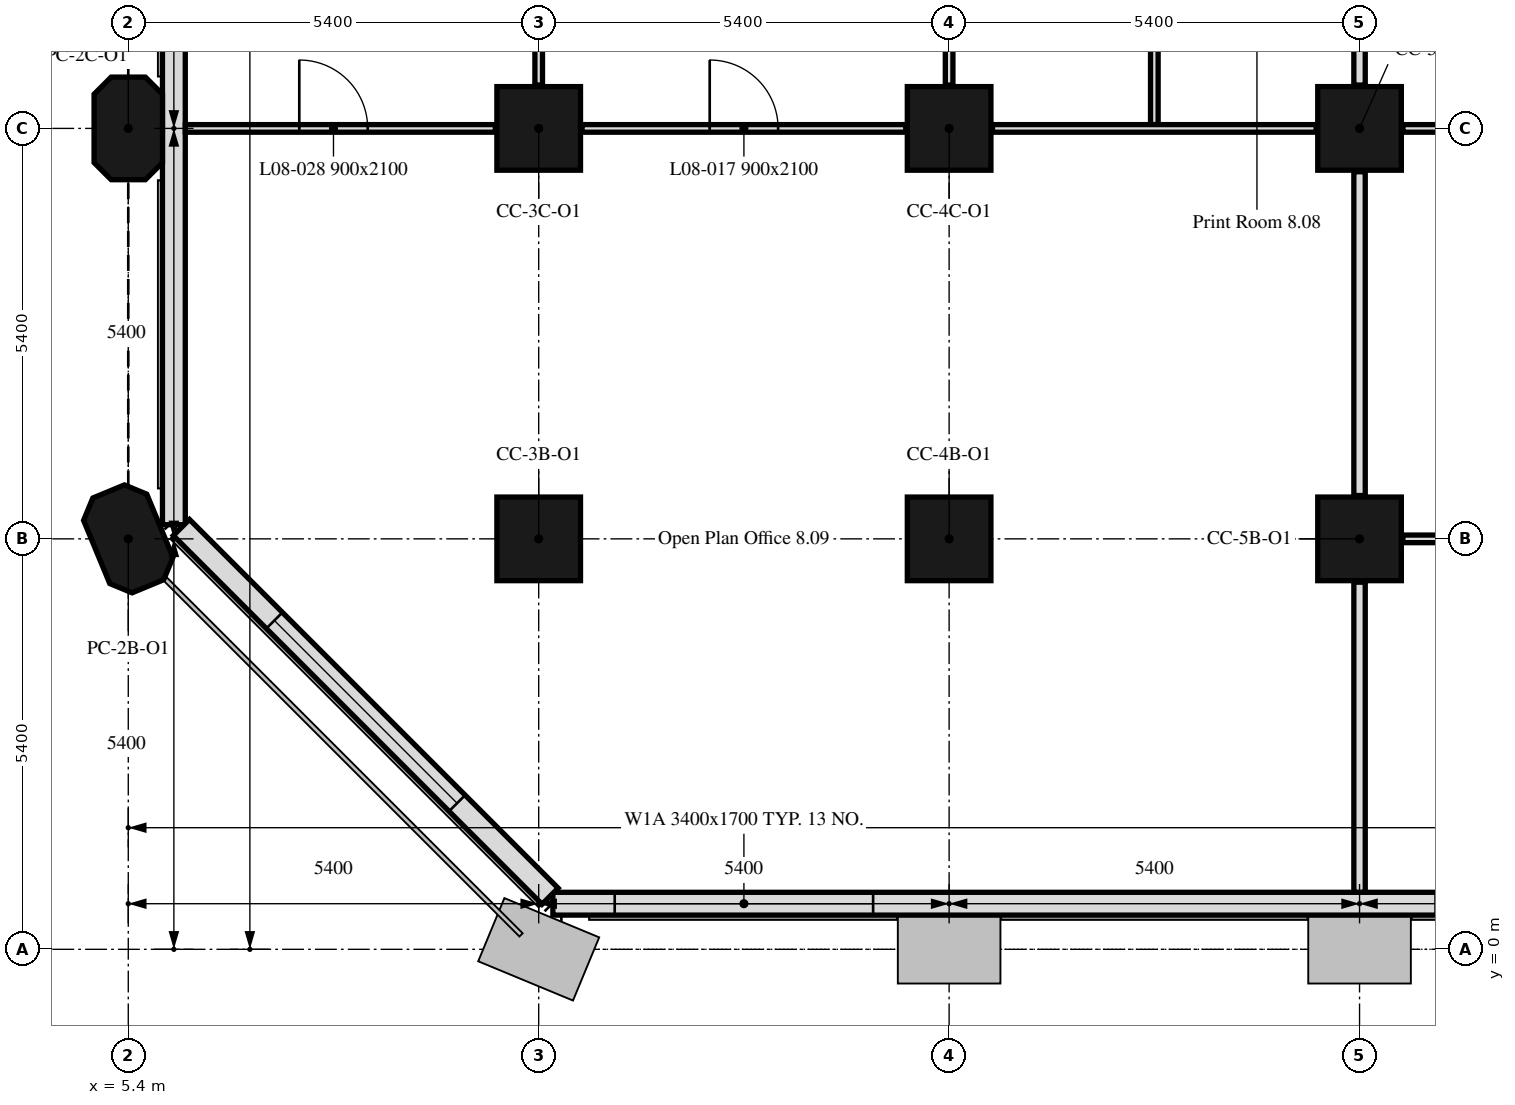
"""IFC4 building model, lengths in metres.
Left out: names, types, materials, properties, quantities, classifications, styles, units other than length and angle.
Written with IfcOpenShell. Run it as: python <this file> out.ifc"""

import sys

from ifc_helpers import new_model, si_unit, direction, frame, frame_2d, origin, origin_2d, place, context, subcontext, project, spatial, polyline, rectangle, outline, extrude, element, fill, save


model = new_model("IFC4")
c1 = context("Model", 3, precision=1e-05, world=origin(), true_north=direction((0.0, 1.0)))
c2 = subcontext(c1, "Body", "Model", "MODEL_VIEW")
j1 = project(units=[si_unit("LENGTHUNIT", "METRE"), si_unit("PLANEANGLEUNIT", "RADIAN")], contexts=[c1])
p1 = place(None, origin())
s1 = spatial("IfcSite", under=j1, at=p1, CompositionType="ELEMENT")
p2 = place(p1, origin())
s2 = spatial("IfcBuilding", under=s1, at=p2, CompositionType="ELEMENT")
p3 = place(p2, frame((0.0, 0.0, 41.2)))
s3 = spatial("IfcBuildingStorey", under=s2, at=p3, CompositionType="ELEMENT", Elevation=41.2)
p4 = place(p3, frame((5.4, 5.4, 0.0), z_axis=(0.0, 0.0, 1.0), x_axis=(-0.382683432365, 0.923879532511, 0.0)))
e1 = element("IfcColumn", 1, at=p4, inside=s3, PredefinedType="COLUMN", context=c2, shape_type="SweptSolid", body=[
    extrude(outline(polyline([(-0.45, -0.45), (0.45, -0.45), (0.675, -0.225), (0.675, 0.225), (0.45, 0.45), (-0.45, 0.45), (-0.675, 0.225), (-0.675, -0.225), (-0.45, -0.45)])), origin(), (0.0, 0.0, 1.0), 3.5),
])
for number, where, z_axis, x_axis in (
    (2, (10.8, 5.4, 0.0), (0.0, 0.0, 1.0), (1.0, 0.0, 0.0)),
    (3, (16.2, 5.4, 0.0), (0.0, 0.0, 1.0), (1.0, 0.0, 0.0)),
    (4, (21.6, 5.4, 0.0), (0.0, 0.0, 1.0), (1.0, 0.0, 0.0)),
):
    element("IfcColumn", number, at=place(p3, frame(where, z_axis=z_axis, x_axis=x_axis)), inside=s3, PredefinedType="COLUMN", context=c2, shape_type="SweptSolid", body=[
        extrude(rectangle(XDim=1.1, YDim=1.1, at=origin_2d()), origin(), (0.0, 0.0, 1.0), 3.5),
    ])
p5 = place(p3, frame((5.4, 10.8, 0.0), z_axis=(0.0, 0.0, 1.0), x_axis=(0.0, 1.0, 0.0)))
e5 = element("IfcColumn", 5, at=p5, inside=s3, PredefinedType="COLUMN", context=c2, shape_type="SweptSolid", body=[
    extrude(outline(polyline([(-0.45, -0.45), (0.45, -0.45), (0.675, -0.225), (0.675, 0.225), (0.45, 0.45), (-0.45, 0.45), (-0.675, 0.225), (-0.675, -0.225), (-0.45, -0.45)])), origin(), (0.0, 0.0, 1.0), 3.5),
])
for number, where, z_axis, x_axis in (
    (6, (10.8, 10.8, 0.0), (0.0, 0.0, 1.0), (1.0, 0.0, 0.0)),
    (7, (16.2, 10.8, 0.0), (0.0, 0.0, 1.0), (1.0, 0.0, 0.0)),
    (8, (21.6, 10.8, 0.0), (0.0, 0.0, 1.0), (1.0, 0.0, 0.0)),
):
    element("IfcColumn", number, at=place(p3, frame(where, z_axis=z_axis, x_axis=x_axis)), inside=s3, PredefinedType="COLUMN", context=c2, shape_type="SweptSolid", body=[
        extrude(rectangle(XDim=1.1, YDim=1.1, at=origin_2d()), origin(), (0.0, 0.0, 1.0), 3.5),
    ])
p6 = place(p3, frame((10.986, 0.6, 0.0), z_axis=(0.0, 0.0, 1.0), x_axis=(1.0, 0.0, 0.0)))
e9 = element("IfcWall", 9, at=p6, inside=s3, PredefinedType="SOLIDWALL", context=c2, shape_type="SweptSolid", body=[
    extrude(rectangle(XDim=32.027, YDim=0.3, at=frame_2d((16.014, 0.0))), origin(), (0.0, 0.0, 1.0), 3.5),
])
p7 = place(p6, frame((0.814, 0.0, 0.9)))
e10 = element("IfcOpeningElement", 10, at=p7, cuts=e9, PredefinedType="OPENING", context=c2, shape_type="SweptSolid", body=[
    extrude(rectangle(XDim=3.4, YDim=1.7, at=frame_2d((1.7, 0.85))), frame((0.0, 0.16, 0.0), z_axis=(0.0, -1.0, 0.0), x_axis=(1.0, 0.0, 0.0)), (0.0, 0.0, 1.0), 0.32),
])
p8 = place(p6, frame((11.614, 0.0, 0.9)))
e11 = element("IfcOpeningElement", 11, at=p8, cuts=e9, PredefinedType="OPENING", context=c2, shape_type="SweptSolid", body=[
    extrude(rectangle(XDim=3.4, YDim=1.7, at=frame_2d((1.7, 0.85))), frame((0.0, 0.16, 0.0), z_axis=(0.0, -1.0, 0.0), x_axis=(1.0, 0.0, 0.0)), (0.0, 0.0, 1.0), 0.32),
])
p9 = place(p6, frame((22.414, 0.0, 0.9)))
e12 = element("IfcOpeningElement", 12, at=p9, cuts=e9, PredefinedType="OPENING", context=c2, shape_type="SweptSolid", body=[
    extrude(rectangle(XDim=3.4, YDim=1.7, at=frame_2d((1.7, 0.85))), frame((0.0, 0.16, 0.0), z_axis=(0.0, -1.0, 0.0), x_axis=(1.0, 0.0, 0.0)), (0.0, 0.0, 1.0), 0.32),
])
p10 = place(p3, frame((6.0, 16.2, 0.0), z_axis=(0.0, 0.0, 1.0), x_axis=(0.0, -1.0, 0.0)))
e13 = element("IfcWall", 13, at=p10, inside=s3, PredefinedType="SOLIDWALL", context=c2, shape_type="SweptSolid", body=[
    extrude(rectangle(XDim=10.614, YDim=0.3, at=frame_2d((5.307, 0.0))), origin(), (0.0, 0.0, 1.0), 3.5),
])
p11 = place(p10, frame((1.35, 0.0, 0.9)))
e14 = element("IfcOpeningElement", 14, at=p11, cuts=e13, PredefinedType="OPENING", context=c2, shape_type="SweptSolid", body=[
    extrude(rectangle(XDim=1.1, YDim=1.7, at=frame_2d((0.55, 0.85))), frame((0.0, 0.16, 0.0), z_axis=(0.0, -1.0, 0.0), x_axis=(1.0, 0.0, 0.0)), (0.0, 0.0, 1.0), 0.32),
])
p12 = place(p10, frame((2.95, 0.0, 0.9)))
e15 = element("IfcOpeningElement", 15, at=p12, cuts=e13, PredefinedType="OPENING", context=c2, shape_type="SweptSolid", body=[
    extrude(rectangle(XDim=1.1, YDim=1.7, at=frame_2d((0.55, 0.85))), frame((0.0, 0.16, 0.0), z_axis=(0.0, -1.0, 0.0), x_axis=(1.0, 0.0, 0.0)), (0.0, 0.0, 1.0), 0.32),
])
p13 = place(p3, frame((6.099, 5.55, 0.0), z_axis=(0.0, 0.0, 1.0), x_axis=(0.707106781187, -0.707106781187, 0.0)))
e16 = element("IfcWall", 16, at=p13, inside=s3, PredefinedType="SOLIDWALL", context=c2, shape_type="SweptSolid", body=[
    extrude(rectangle(XDim=6.86, YDim=0.3, at=frame_2d((3.43, 0.0))), origin(), (0.0, 0.0, 1.0), 3.5),
])
p14 = place(p13, frame((1.73, 0.0, 0.9)))
e17 = element("IfcOpeningElement", 17, at=p14, cuts=e16, PredefinedType="OPENING", context=c2, shape_type="SweptSolid", body=[
    extrude(rectangle(XDim=3.4, YDim=1.7, at=frame_2d((1.7, 0.85))), frame((0.0, 0.16, 0.0), z_axis=(0.0, -1.0, 0.0), x_axis=(1.0, 0.0, 0.0)), (0.0, 0.0, 1.0), 0.32),
])
p15 = place(p3, frame((6.151, 10.8, 0.0), z_axis=(0.0, 0.0, 1.0), x_axis=(1.0, 0.0, 0.0)))
e18 = element("IfcWall", 18, at=p15, inside=s3, PredefinedType="PARTITIONING", context=c2, shape_type="SweptSolid", body=[
    extrude(rectangle(XDim=4.079, YDim=0.1, at=frame_2d((2.04, 0.0))), origin(), (0.0, 0.0, 1.0), 3.5),
])
p16 = place(p15, frame((1.499, 0.0, 0.0)))
e19 = element("IfcOpeningElement", 19, at=p16, cuts=e18, PredefinedType="OPENING", context=c2, shape_type="SweptSolid", body=[
    extrude(rectangle(XDim=0.9, YDim=2.1, at=frame_2d((0.45, 1.05))), frame((0.0, 0.05, 0.0), z_axis=(0.0, -1.0, 0.0), x_axis=(1.0, 0.0, 0.0)), (0.0, 0.0, 1.0), 0.1),
])
p17 = place(p3, frame((10.8, 11.37, 0.0), z_axis=(0.0, 0.0, 1.0), x_axis=(0.0, 1.0, 0.0)))
e20 = element("IfcWall", 20, at=p17, inside=s3, PredefinedType="PARTITIONING", context=c2, shape_type="SweptSolid", body=[
    extrude(rectangle(XDim=2.055, YDim=0.1, at=frame_2d((1.027, 0.0))), origin(), (0.0, 0.0, 1.0), 3.5),
])
p18 = place(p3, frame((11.37, 10.8, 0.0), z_axis=(0.0, 0.0, 1.0), x_axis=(1.0, 0.0, 0.0)))
e21 = element("IfcWall", 21, at=p18, inside=s3, PredefinedType="PARTITIONING", context=c2, shape_type="SweptSolid", body=[
    extrude(rectangle(XDim=4.26, YDim=0.1, at=frame_2d((2.13, 0.0))), origin(), (0.0, 0.0, 1.0), 3.5),
])
p19 = place(p18, frame((1.68, 0.0, 0.0)))
e22 = element("IfcOpeningElement", 22, at=p19, cuts=e21, PredefinedType="OPENING", context=c2, shape_type="SweptSolid", body=[
    extrude(rectangle(XDim=0.9, YDim=2.1, at=frame_2d((0.45, 1.05))), frame((0.0, 0.05, 0.0), z_axis=(0.0, -1.0, 0.0), x_axis=(1.0, 0.0, 0.0)), (0.0, 0.0, 1.0), 0.1),
])
p20 = place(p3, frame((16.2, 11.37, 0.0), z_axis=(0.0, 0.0, 1.0), x_axis=(0.0, 1.0, 0.0)))
e23 = element("IfcWall", 23, at=p20, inside=s3, PredefinedType="PARTITIONING", context=c2, shape_type="SweptSolid", body=[
    extrude(rectangle(XDim=2.055, YDim=0.1, at=frame_2d((1.027, 0.0))), origin(), (0.0, 0.0, 1.0), 2.75),
])
p21 = place(p3, frame((18.9, 10.85, 0.0), z_axis=(0.0, 0.0, 1.0), x_axis=(0.0, 1.0, 0.0)))
e24 = element("IfcWall", 24, at=p21, inside=s3, PredefinedType="PARTITIONING", context=c2, shape_type="SweptSolid", body=[
    extrude(rectangle(XDim=2.575, YDim=0.1, at=frame_2d((1.288, 0.0))), origin(), (0.0, 0.0, 1.0), 3.5),
])
p22 = place(p3, frame((16.77, 10.8, 0.0), z_axis=(0.0, 0.0, 1.0), x_axis=(1.0, 0.0, 0.0)))
e25 = element("IfcWall", 25, at=p22, inside=s3, PredefinedType="PARTITIONING", context=c2, shape_type="SweptSolid", body=[
    extrude(rectangle(XDim=4.26, YDim=0.1, at=frame_2d((2.13, 0.0))), origin(), (0.0, 0.0, 1.0), 3.5),
])
p23 = place(p3, frame((21.6, 11.37, 0.0), z_axis=(0.0, 0.0, 1.0), x_axis=(0.0, 1.0, 0.0)))
e26 = element("IfcWall", 26, at=p23, inside=s3, PredefinedType="PARTITIONING", context=c2, shape_type="SweptSolid", body=[
    extrude(rectangle(XDim=2.055, YDim=0.15, at=frame_2d((1.027, 0.0))), origin(), (0.0, 0.0, 1.0), 2.75),
])
p24 = place(p3, frame((21.6, 0.751, 0.0), z_axis=(0.0, 0.0, 1.0), x_axis=(0.0, 1.0, 0.0)))
e27 = element("IfcWall", 27, at=p24, inside=s3, PredefinedType="PARTITIONING", context=c2, shape_type="SweptSolid", body=[
    extrude(rectangle(XDim=4.079, YDim=0.15, at=frame_2d((2.04, 0.0))), origin(), (0.0, 0.0, 1.0), 2.75),
])
p25 = place(p3, frame((21.6, 5.97, 0.0), z_axis=(0.0, 0.0, 1.0), x_axis=(0.0, 1.0, 0.0)))
e28 = element("IfcWall", 28, at=p25, inside=s3, PredefinedType="PARTITIONING", context=c2, shape_type="SweptSolid", body=[
    extrude(rectangle(XDim=4.26, YDim=0.15, at=frame_2d((2.13, 0.0))), origin(), (0.0, 0.0, 1.0), 2.75),
])
p26 = place(p3, frame((22.17, 10.8, 0.0), z_axis=(0.0, 0.0, 1.0), x_axis=(1.0, 0.0, 0.0)))
e29 = element("IfcWall", 29, at=p26, inside=s3, PredefinedType="PARTITIONING", context=c2, shape_type="SweptSolid", body=[
    extrude(rectangle(XDim=4.26, YDim=0.1, at=frame_2d((2.13, 0.0))), origin(), (0.0, 0.0, 1.0), 3.5),
])
p27 = place(p26, frame((1.68, 0.0, 0.0)))
e30 = element("IfcOpeningElement", 30, at=p27, cuts=e29, PredefinedType="OPENING", context=c2, shape_type="SweptSolid", body=[
    extrude(rectangle(XDim=0.9, YDim=2.1, at=frame_2d((0.45, 1.05))), frame((0.0, 0.05, 0.0), z_axis=(0.0, -1.0, 0.0), x_axis=(1.0, 0.0, 0.0)), (0.0, 0.0, 1.0), 0.1),
])
p28 = place(p3, frame((22.17, 5.4, 0.0), z_axis=(0.0, 0.0, 1.0), x_axis=(1.0, 0.0, 0.0)))
e31 = element("IfcWall", 31, at=p28, inside=s3, PredefinedType="PARTITIONING", context=c2, shape_type="SweptSolid", body=[
    extrude(rectangle(XDim=4.26, YDim=0.1, at=frame_2d((2.13, 0.0))), origin(), (0.0, 0.0, 1.0), 3.5),
])
p29 = place(p28, frame((1.68, 0.0, 0.0)))
e32 = element("IfcOpeningElement", 32, at=p29, cuts=e31, PredefinedType="OPENING", context=c2, shape_type="SweptSolid", body=[
    extrude(rectangle(XDim=0.9, YDim=2.1, at=frame_2d((0.45, 1.05))), frame((0.0, 0.05, 0.0), z_axis=(0.0, -1.0, 0.0), x_axis=(1.0, 0.0, 0.0)), (0.0, 0.0, 1.0), 0.1),
])
p30 = place(p7, origin())
e33 = element("IfcWindow", 33, at=p30, inside=s3, PartitioningType="SINGLE_PANEL", PredefinedType="WINDOW", context=c2, shape_type="SweptSolid", body=[
    extrude(rectangle(XDim=3.4, YDim=1.7, at=frame_2d((1.7, 0.85))), frame((0.0, 0.03, 0.0), z_axis=(0.0, -1.0, 0.0), x_axis=(1.0, 0.0, 0.0)), (0.0, 0.0, 1.0), 0.06),
])
fill(e10, e33)
p31 = place(p8, origin())
e34 = element("IfcWindow", 34, at=p31, inside=s3, PartitioningType="SINGLE_PANEL", PredefinedType="WINDOW", context=c2, shape_type="SweptSolid", body=[
    extrude(rectangle(XDim=3.4, YDim=1.7, at=frame_2d((1.7, 0.85))), frame((0.0, 0.03, 0.0), z_axis=(0.0, -1.0, 0.0), x_axis=(1.0, 0.0, 0.0)), (0.0, 0.0, 1.0), 0.06),
])
fill(e11, e34)
p32 = place(p14, origin())
e35 = element("IfcWindow", 35, at=p32, inside=s3, PartitioningType="SINGLE_PANEL", PredefinedType="WINDOW", context=c2, shape_type="SweptSolid", body=[
    extrude(rectangle(XDim=3.4, YDim=1.7, at=frame_2d((1.7, 0.85))), frame((0.0, 0.03, 0.0), z_axis=(0.0, -1.0, 0.0), x_axis=(1.0, 0.0, 0.0)), (0.0, 0.0, 1.0), 0.06),
])
fill(e17, e35)
p33 = place(p19, origin())
e36 = element("IfcDoor", 36, at=p33, inside=s3, OperationType="SINGLE_SWING_LEFT", PredefinedType="DOOR", context=c2, shape_type="SweptSolid", body=[
    extrude(rectangle(XDim=0.9, YDim=2.1, at=frame_2d((0.45, 1.05))), frame((0.0, 0.025, 0.0), z_axis=(0.0, -1.0, 0.0), x_axis=(1.0, 0.0, 0.0)), (0.0, 0.0, 1.0), 0.05),
])
fill(e22, e36)
p34 = place(p16, origin())
e37 = element("IfcDoor", 37, at=p34, inside=s3, OperationType="SINGLE_SWING_RIGHT", PredefinedType="DOOR", context=c2, shape_type="SweptSolid", body=[
    extrude(rectangle(XDim=0.9, YDim=2.1, at=frame_2d((0.45, 1.05))), frame((0.0, 0.025, 0.0), z_axis=(0.0, -1.0, 0.0), x_axis=(1.0, 0.0, 0.0)), (0.0, 0.0, 1.0), 0.05),
])
fill(e19, e37)
save(model, sys.argv[1])
